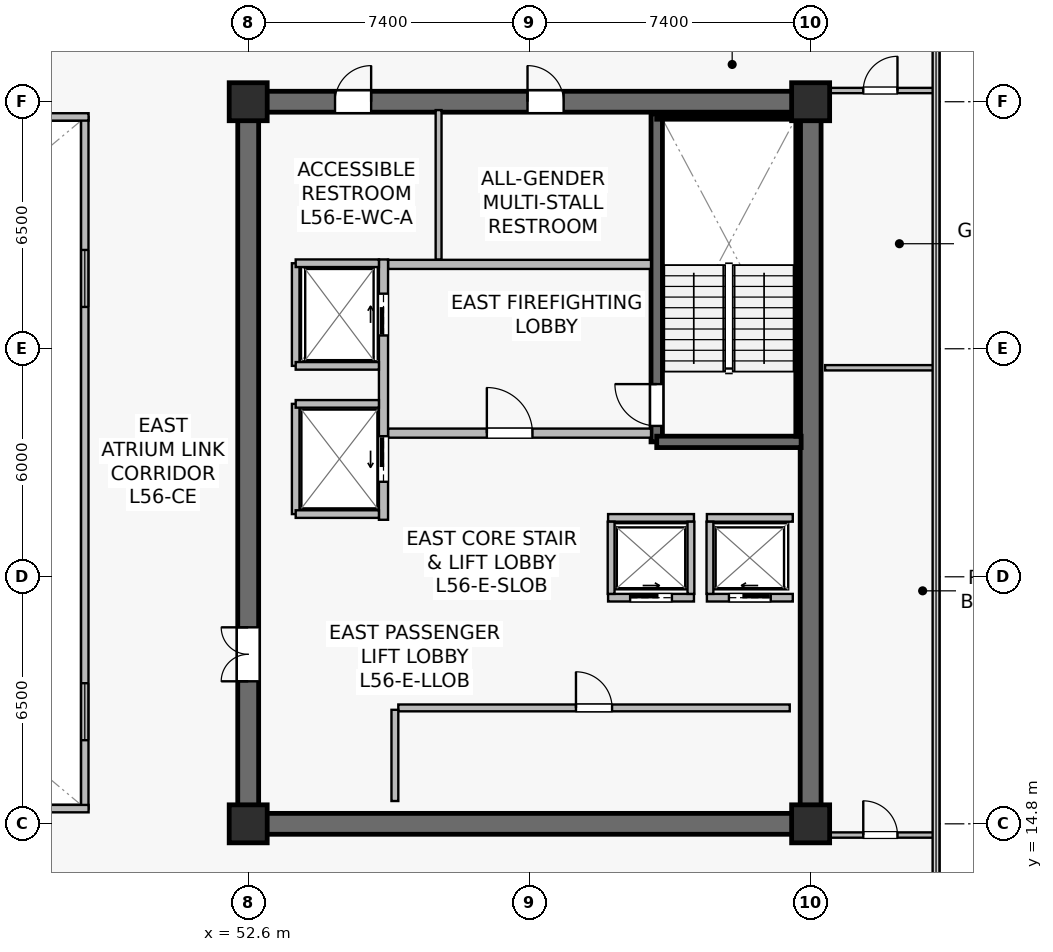
"""IFC4 building model, lengths in metres.
Left out: names, types, materials, properties, quantities, classifications, styles, units other than length and angle.
Written with IfcOpenShell. Run it as: python <this file> out.ifc"""

import sys

from ifc_helpers import new_model, si_unit, direction, frame, frame_2d, origin, origin_2d, place, context, subcontext, project, spatial, rectangle, extrude, source, transform, mapped, element, fill, save


model = new_model("IFC4")
c1 = context("Model", 3, precision=1e-05, world=origin(), true_north=direction((0.0, 1.0)))
c2 = subcontext(c1, "Body", "Model", "MODEL_VIEW")
j1 = project(units=[si_unit("LENGTHUNIT", "METRE"), si_unit("PLANEANGLEUNIT", "RADIAN")], contexts=[c1])
p1 = place(None, origin())
s1 = spatial("IfcSite", under=j1, at=p1, CompositionType="ELEMENT")
p2 = place(p1, origin())
s2 = spatial("IfcBuilding", under=s1, at=p2, CompositionType="ELEMENT")
p3 = place(p2, frame((0.0, 0.0, 234.2)))
s3 = spatial("IfcBuildingStorey", under=s2, at=p3, CompositionType="ELEMENT", Elevation=234.2)
p4 = place(p3, frame((52.325, 14.8, 0.0), z_axis=(0.0, 0.0, 1.0), x_axis=(1.0, 0.0, 0.0)))
e1 = element("IfcWall", 1, at=p4, inside=s3, PredefinedType="SHEAR", context=c2, shape_type="SweptSolid", body=[
    extrude(rectangle(XDim=15.35, YDim=0.55, at=frame_2d((7.675, 0.0))), origin(), (0.0, 0.0, 1.0), 3.8),
])
p5 = place(p3, frame((52.325, 33.8, 0.0), z_axis=(0.0, 0.0, 1.0), x_axis=(1.0, 0.0, 0.0)))
e2 = element("IfcWall", 2, at=p5, inside=s3, PredefinedType="SHEAR", context=c2, shape_type="SweptSolid", body=[
    extrude(rectangle(XDim=15.35, YDim=0.55, at=frame_2d((7.675, 0.0))), origin(), (0.0, 0.0, 1.0), 3.8),
])
p6 = place(p5, frame((7.625, 0.0, 0.0)))
e3 = element("IfcOpeningElement", 3, at=p6, cuts=e2, PredefinedType="OPENING", context=c2, shape_type="SweptSolid", body=[
    extrude(rectangle(XDim=0.95, YDim=2.15, at=frame_2d((0.475, 1.075))), frame((0.0, 0.285, 0.0), z_axis=(0.0, -1.0, 0.0), x_axis=(1.0, 0.0, 0.0)), (0.0, 0.0, 1.0), 0.57),
])
p7 = place(p5, frame((2.56, 0.0, 0.0)))
e4 = element("IfcOpeningElement", 4, at=p7, cuts=e2, PredefinedType="OPENING", context=c2, shape_type="SweptSolid", body=[
    extrude(rectangle(XDim=0.95, YDim=2.15, at=frame_2d((0.475, 1.075))), frame((0.0, 0.285, 0.0), z_axis=(0.0, -1.0, 0.0), x_axis=(1.0, 0.0, 0.0)), (0.0, 0.0, 1.0), 0.57),
])
p8 = place(p3, frame((52.6, 15.075, 0.0), z_axis=(0.0, 0.0, 1.0), x_axis=(0.0, 1.0, 0.0)))
e5 = element("IfcWall", 5, at=p8, inside=s3, PredefinedType="SHEAR", context=c2, shape_type="SweptSolid", body=[
    extrude(rectangle(XDim=18.45, YDim=0.55, at=frame_2d((9.225, 0.0))), origin(), (0.0, 0.0, 1.0), 3.8),
])
p9 = place(p8, frame((3.475, 0.0, 0.0)))
e6 = element("IfcOpeningElement", 6, at=p9, cuts=e5, PredefinedType="OPENING", context=c2, shape_type="SweptSolid", body=[
    extrude(rectangle(XDim=1.42, YDim=2.2, at=frame_2d((0.71, 1.1))), frame((0.0, 0.285, 0.0), z_axis=(0.0, -1.0, 0.0), x_axis=(1.0, 0.0, 0.0)), (0.0, 0.0, 1.0), 0.57),
])
p10 = place(p3, frame((67.4, 15.075, 0.0), z_axis=(0.0, 0.0, 1.0), x_axis=(0.0, 1.0, 0.0)))
e7 = element("IfcWall", 7, at=p10, inside=s3, PredefinedType="SHEAR", context=c2, shape_type="SweptSolid", body=[
    extrude(rectangle(XDim=18.45, YDim=0.55, at=frame_2d((9.225, 0.0))), origin(), (0.0, 0.0, 1.0), 3.8),
])
p11 = place(p3, frame((63.35, 24.85, 0.0), z_axis=(0.0, 0.0, 1.0), x_axis=(0.0, 1.0, 0.0)))
e8 = element("IfcWall", 8, at=p11, inside=s3, PredefinedType="SHEAR", context=c2, shape_type="SweptSolid", body=[
    extrude(rectangle(XDim=8.63, YDim=0.3, at=frame_2d((4.315, 0.0))), origin(), (0.0, 0.0, 1.0), 3.8),
])
p12 = place(p11, frame((0.42, 0.0, 0.0)))
e9 = element("IfcOpeningElement", 9, at=p12, cuts=e8, PredefinedType="OPENING", context=c2, shape_type="SweptSolid", body=[
    extrude(rectangle(XDim=1.1, YDim=2.15, at=frame_2d((0.55, 1.075))), frame((0.0, 0.16, 0.0), z_axis=(0.0, -1.0, 0.0), x_axis=(1.0, 0.0, 0.0)), (0.0, 0.0, 1.0), 0.32),
])
p13 = place(p3, frame((63.35, 24.85, 0.0), z_axis=(0.0, 0.0, 1.0), x_axis=(1.0, 0.0, 0.0)))
e10 = element("IfcWall", 10, at=p13, inside=s3, PredefinedType="SHEAR", context=c2, shape_type="SweptSolid", body=[
    extrude(rectangle(XDim=3.8, YDim=0.3, at=frame_2d((1.9, 0.0))), origin(), (0.0, 0.0, 1.0), 3.8),
])
p14 = place(p3, frame((63.35, 33.4, 0.0), z_axis=(0.0, 0.0, 1.0), x_axis=(1.0, 0.0, 0.0)))
e11 = element("IfcWall", 11, at=p14, inside=s3, PredefinedType="SOLIDWALL", context=c2, shape_type="SweptSolid", body=[
    extrude(rectangle(XDim=3.72, YDim=0.12, at=frame_2d((1.86, 0.0))), origin(), (0.0, 0.0, 1.0), 3.8),
])
p15 = place(p3, frame((67.07, 25.0, 0.0), z_axis=(0.0, 0.0, 1.0), x_axis=(0.0, 1.0, 0.0)))
e12 = element("IfcWall", 12, at=p15, inside=s3, PredefinedType="SOLIDWALL", context=c2, shape_type="SweptSolid", body=[
    extrude(rectangle(XDim=8.32, YDim=0.12, at=frame_2d((4.16, 0.0))), origin(), (0.0, 0.0, 1.0), 3.8),
])
m1 = source(origin(), c2, "Body", "SweptSolid", [
    extrude(rectangle(XDim=1.0, YDim=1.0, at=origin_2d()), origin(), (0.0, 0.0, 1.0), 4.1),
])
for number, where, z_axis, x_axis in (
    (13, (52.6, 14.8, 0.0), (0.0, 0.0, 1.0), (1.0, 0.0, 0.0)),
    (14, (67.4, 14.8, 0.0), (0.0, 0.0, 1.0), (1.0, 0.0, 0.0)),
    (15, (52.6, 33.8, 0.0), (0.0, 0.0, 1.0), (1.0, 0.0, 0.0)),
    (16, (67.4, 33.8, 0.0), (0.0, 0.0, 1.0), (1.0, 0.0, 0.0)),
):
    element("IfcColumn", number, at=place(p3, frame(where, z_axis=z_axis, x_axis=x_axis)), inside=s3, PredefinedType="COLUMN", context=c2, shape_type="MappedRepresentation", body=[
        mapped(m1, transform((0.0, 0.0, 0.0), scale=1.0)),
    ])
p16 = place(p3, frame((56.28, 25.08, 0.0), z_axis=(0.0, 0.0, 1.0), x_axis=(1.0, 0.0, 0.0)))
e17 = element("IfcWall", 17, at=p16, inside=s3, PredefinedType="SOLIDWALL", context=c2, shape_type="SweptSolid", body=[
    extrude(rectangle(XDim=6.92, YDim=0.24, at=frame_2d((3.46, 0.0))), origin(), (0.0, 0.0, 1.0), 3.197),
])
p17 = place(p16, frame((2.6, 0.0, 0.0)))
e18 = element("IfcOpeningElement", 18, at=p17, cuts=e17, PredefinedType="OPENING", context=c2, shape_type="SweptSolid", body=[
    extrude(rectangle(XDim=1.2, YDim=2.16, at=frame_2d((0.6, 1.08))), frame((0.0, 0.13, 0.0), z_axis=(0.0, -1.0, 0.0), x_axis=(1.0, 0.0, 0.0)), (0.0, 0.0, 1.0), 0.26),
])
p18 = place(p3, frame((56.28, 29.52, 0.0), z_axis=(0.0, 0.0, 1.0), x_axis=(1.0, 0.0, 0.0)))
e19 = element("IfcWall", 19, at=p18, inside=s3, PredefinedType="SOLIDWALL", context=c2, shape_type="SweptSolid", body=[
    extrude(rectangle(XDim=6.92, YDim=0.24, at=frame_2d((3.46, 0.0))), origin(), (0.0, 0.0, 1.0), 3.197),
])
p19 = place(p3, frame((56.16, 22.8, 0.0), z_axis=(0.0, 0.0, 1.0), x_axis=(0.0, 1.0, 0.0)))
e20 = element("IfcWall", 20, at=p19, inside=s3, PredefinedType="SOLIDWALL", context=c2, shape_type="SweptSolid", body=[
    extrude(rectangle(XDim=6.85, YDim=0.24, at=frame_2d((3.425, 0.0))), origin(), (0.0, 0.0, 1.0), 2.935),
])
p20 = place(p19, frame((4.85, 0.0, 0.0)))
e21 = element("IfcOpeningElement", 21, at=p20, cuts=e20, PredefinedType="OPENING", context=c2, shape_type="SweptSolid", body=[
    extrude(rectangle(XDim=1.1, YDim=2.22, at=frame_2d((0.55, 1.11))), frame((0.0, 0.13, 0.0), z_axis=(0.0, -1.0, 0.0), x_axis=(1.0, 0.0, 0.0)), (0.0, 0.0, 1.0), 0.26),
])
p21 = place(p19, frame((1.0, 0.0, 0.0)))
e22 = element("IfcOpeningElement", 22, at=p21, cuts=e20, PredefinedType="OPENING", context=c2, shape_type="SweptSolid", body=[
    extrude(rectangle(XDim=1.2, YDim=2.22, at=frame_2d((0.6, 1.11))), frame((0.0, 0.13, 0.0), z_axis=(0.0, -1.0, 0.0), x_axis=(1.0, 0.0, 0.0)), (0.0, 0.0, 1.0), 0.26),
])
p22 = place(p3, frame((64.67, 20.75, 0.0), z_axis=(0.0, 0.0, 1.0), x_axis=(1.0, 0.0, 0.0)))
e23 = element("IfcWall", 23, at=p22, inside=s3, PredefinedType="SOLIDWALL", context=c2, shape_type="SweptSolid", body=[
    extrude(rectangle(XDim=2.26, YDim=0.2, at=frame_2d((1.13, 0.0))), origin(), (0.0, 0.0, 1.0), 3.8),
])
p23 = place(p22, frame((0.58, 0.0, 0.0)))
e24 = element("IfcOpeningElement", 24, at=p23, cuts=e23, PredefinedType="OPENING", context=c2, shape_type="SweptSolid", body=[
    extrude(rectangle(XDim=1.1, YDim=2.22, at=frame_2d((0.55, 1.11))), frame((0.0, 0.11, 0.0), z_axis=(0.0, -1.0, 0.0), x_axis=(1.0, 0.0, 0.0)), (0.0, 0.0, 1.0), 0.22),
])
p24 = place(p3, frame((64.67, 22.85, 0.0), z_axis=(0.0, 0.0, 1.0), x_axis=(1.0, 0.0, 0.0)))
e25 = element("IfcWall", 25, at=p24, inside=s3, PredefinedType="SOLIDWALL", context=c2, shape_type="SweptSolid", body=[
    extrude(rectangle(XDim=2.26, YDim=0.2, at=frame_2d((1.13, 0.0))), origin(), (0.0, 0.0, 1.0), 3.8),
])
p25 = place(p3, frame((64.75, 20.85, 0.0), z_axis=(0.0, 0.0, 1.0), x_axis=(0.0, 1.0, 0.0)))
e26 = element("IfcWall", 26, at=p25, inside=s3, PredefinedType="SOLIDWALL", context=c2, shape_type="SweptSolid", body=[
    extrude(rectangle(XDim=1.9, YDim=0.18, at=frame_2d((0.95, 0.0))), origin(), (0.0, 0.0, 1.0), 3.8),
])
p26 = place(p3, frame((62.07, 20.75, 0.0), z_axis=(0.0, 0.0, 1.0), x_axis=(1.0, 0.0, 0.0)))
e27 = element("IfcWall", 27, at=p26, inside=s3, PredefinedType="SOLIDWALL", context=c2, shape_type="SweptSolid", body=[
    extrude(rectangle(XDim=2.26, YDim=0.2, at=frame_2d((1.13, 0.0))), origin(), (0.0, 0.0, 1.0), 3.8),
])
p27 = place(p26, frame((0.58, 0.0, 0.0)))
e28 = element("IfcOpeningElement", 28, at=p27, cuts=e27, PredefinedType="OPENING", context=c2, shape_type="SweptSolid", body=[
    extrude(rectangle(XDim=1.1, YDim=2.22, at=frame_2d((0.55, 1.11))), frame((0.0, 0.11, 0.0), z_axis=(0.0, -1.0, 0.0), x_axis=(1.0, 0.0, 0.0)), (0.0, 0.0, 1.0), 0.22),
])
p28 = place(p3, frame((62.07, 22.85, 0.0), z_axis=(0.0, 0.0, 1.0), x_axis=(1.0, 0.0, 0.0)))
e29 = element("IfcWall", 29, at=p28, inside=s3, PredefinedType="SOLIDWALL", context=c2, shape_type="SweptSolid", body=[
    extrude(rectangle(XDim=2.26, YDim=0.2, at=frame_2d((1.13, 0.0))), origin(), (0.0, 0.0, 1.0), 3.8),
])
for number, where, z_axis, x_axis in (
    (30, (62.15, 20.85, 0.0), (0.0, 0.0, 1.0), (0.0, 1.0, 0.0)),
    (31, (64.25, 20.85, 0.0), (0.0, 0.0, 1.0), (0.0, 1.0, 0.0)),
):
    element("IfcWall", number, at=place(p3, frame(where, z_axis=z_axis, x_axis=x_axis)), inside=s3, PredefinedType="SOLIDWALL", context=c2, shape_type="SweptSolid", body=[
        extrude(rectangle(XDim=1.9, YDim=0.18, at=frame_2d((0.95, 0.0))), origin(), (0.0, 0.0, 1.0), 3.8),
    ])
p29 = place(p3, frame((53.85, 26.85, 0.0), z_axis=(0.0, 0.0, 1.0), x_axis=(0.0, 1.0, 0.0)))
e32 = element("IfcWall", 32, at=p29, inside=s3, PredefinedType="SOLIDWALL", context=c2, shape_type="SweptSolid", body=[
    extrude(rectangle(XDim=2.7, YDim=0.2, at=frame_2d((1.35, 0.0))), origin(), (0.0, 0.0, 1.0), 3.8),
])
p30 = place(p3, frame((53.85, 29.55, 0.0), z_axis=(0.0, 0.0, 1.0), x_axis=(1.0, 0.0, 0.0)))
e33 = element("IfcWall", 33, at=p30, inside=s3, PredefinedType="SOLIDWALL", context=c2, shape_type="SweptSolid", body=[
    extrude(rectangle(XDim=2.19, YDim=0.2, at=frame_2d((1.095, 0.0))), origin(), (0.0, 0.0, 1.0), 3.8),
])
p31 = place(p3, frame((53.85, 26.85, 0.0), z_axis=(0.0, 0.0, 1.0), x_axis=(1.0, 0.0, 0.0)))
e34 = element("IfcWall", 34, at=p31, inside=s3, PredefinedType="SOLIDWALL", context=c2, shape_type="SweptSolid", body=[
    extrude(rectangle(XDim=2.19, YDim=0.2, at=frame_2d((1.095, 0.0))), origin(), (0.0, 0.0, 1.0), 3.197),
])
p32 = place(p3, frame((53.85, 22.95, 0.0), z_axis=(0.0, 0.0, 1.0), x_axis=(0.0, 1.0, 0.0)))
e35 = element("IfcWall", 35, at=p32, inside=s3, PredefinedType="SOLIDWALL", context=c2, shape_type="SweptSolid", body=[
    extrude(rectangle(XDim=2.9, YDim=0.2, at=frame_2d((1.45, 0.0))), origin(), (0.0, 0.0, 1.0), 2.935),
])
for number, where, z_axis, x_axis in (
    (36, (53.85, 25.85, 0.0), (0.0, 0.0, 1.0), (1.0, 0.0, 0.0)),
    (37, (53.85, 22.95, 0.0), (0.0, 0.0, 1.0), (1.0, 0.0, 0.0)),
):
    element("IfcWall", number, at=place(p3, frame(where, z_axis=z_axis, x_axis=x_axis)), inside=s3, PredefinedType="SOLIDWALL", context=c2, shape_type="SweptSolid", body=[
        extrude(rectangle(XDim=2.19, YDim=0.2, at=frame_2d((1.095, 0.0))), origin(), (0.0, 0.0, 1.0), 3.8),
    ])
p33 = place(p3, frame((56.55, 17.85, 0.0), z_axis=(0.0, 0.0, 1.0), x_axis=(1.0, 0.0, 0.0)))
e38 = element("IfcWall", 38, at=p33, inside=s3, PredefinedType="SOLIDWALL", context=c2, shape_type="SweptSolid", body=[
    extrude(rectangle(XDim=10.3, YDim=0.18, at=frame_2d((5.15, 0.0))), origin(), (0.0, 0.0, 1.0), 3.197),
])
p34 = place(p33, frame((4.675, 0.0, 0.0)))
e39 = element("IfcOpeningElement", 39, at=p34, cuts=e38, PredefinedType="OPENING", context=c2, shape_type="SweptSolid", body=[
    extrude(rectangle(XDim=0.95, YDim=2.15, at=frame_2d((0.475, 1.075))), frame((0.0, 0.1, 0.0), z_axis=(0.0, -1.0, 0.0), x_axis=(1.0, 0.0, 0.0)), (0.0, 0.0, 1.0), 0.2),
])
p35 = place(p3, frame((56.46, 15.4, 0.0), z_axis=(0.0, 0.0, 1.0), x_axis=(0.0, 1.0, 0.0)))
e40 = element("IfcWall", 40, at=p35, inside=s3, PredefinedType="SOLIDWALL", context=c2, shape_type="SweptSolid", body=[
    extrude(rectangle(XDim=2.4, YDim=0.18, at=frame_2d((1.2, 0.0))), origin(), (0.0, 0.0, 1.0), 3.8),
])
p36 = place(p3, frame((57.61, 29.65, 0.0), z_axis=(0.0, 0.0, 1.0), x_axis=(0.0, 1.0, 0.0)))
e41 = element("IfcWall", 41, at=p36, inside=s3, PredefinedType="PLUMBINGWALL", context=c2, shape_type="SweptSolid", body=[
    extrude(rectangle(XDim=3.93, YDim=0.155, at=frame_2d((1.965, 0.0))), origin(), (0.0, 0.0, 1.0), 3.8),
])
p37 = place(p3, frame((48.3, 15.2, 0.0), z_axis=(0.0, 0.0, 1.0), x_axis=(0.0, 1.0, 0.0)))
e42 = element("IfcWall", 42, at=p37, inside=s3, PredefinedType="SOLIDWALL", context=c2, shape_type="SweptSolid", body=[
    extrude(rectangle(XDim=18.2, YDim=0.195, at=frame_2d((9.1, 0.0))), origin(), (0.0, 0.0, 1.0), 3.8),
])
p38 = place(p37, frame((1.8, 0.0, 0.9)))
e43 = element("IfcOpeningElement", 43, at=p38, cuts=e42, PredefinedType="OPENING", context=c2, shape_type="SweptSolid", body=[
    extrude(rectangle(XDim=1.5, YDim=1.4, at=frame_2d((0.75, 0.7))), frame((0.0, 0.107, 0.0), z_axis=(0.0, -1.0, 0.0), x_axis=(1.0, 0.0, 0.0)), (0.0, 0.0, 1.0), 0.215),
])
p39 = place(p37, frame((13.2, 0.0, 0.9)))
e44 = element("IfcOpeningElement", 44, at=p39, cuts=e42, PredefinedType="OPENING", context=c2, shape_type="SweptSolid", body=[
    extrude(rectangle(XDim=1.5, YDim=1.4, at=frame_2d((0.75, 0.7))), frame((0.0, 0.107, 0.0), z_axis=(0.0, -1.0, 0.0), x_axis=(1.0, 0.0, 0.0)), (0.0, 0.0, 1.0), 0.215),
])
for number, where, z_axis, x_axis in (
    (45, (26.4, 15.2, 0.0), (0.0, 0.0, 1.0), (1.0, 0.0, 0.0)),
    (46, (26.4, 33.4, 0.0), (0.0, 0.0, 1.0), (1.0, 0.0, 0.0)),
):
    element("IfcWall", number, at=place(p3, frame(where, z_axis=z_axis, x_axis=x_axis)), inside=s3, PredefinedType="SOLIDWALL", context=c2, shape_type="SweptSolid", body=[
        extrude(rectangle(XDim=22.0, YDim=0.195, at=frame_2d((11.0, 0.0))), origin(), (0.0, 0.0, 1.0), 3.8),
    ])
p40 = place(p3, frame((67.78, 26.8, 0.0), z_axis=(0.0, 0.0, 1.0), x_axis=(1.0, 0.0, 0.0)))
e47 = element("IfcWall", 47, at=p40, inside=s3, PredefinedType="PARTITIONING", context=c2, shape_type="SweptSolid", body=[
    extrude(rectangle(XDim=2.91, YDim=0.14, at=frame_2d((1.455, 0.0))), origin(), (0.0, 0.0, 1.0), 3.8),
])
p41 = place(p3, frame((67.78, 14.505, 0.0), z_axis=(0.0, 0.0, 1.0), x_axis=(1.0, 0.0, 0.0)))
e48 = element("IfcWall", 48, at=p41, inside=s3, PredefinedType="PARTITIONING", context=c2, shape_type="SweptSolid", body=[
    extrude(rectangle(XDim=2.91, YDim=0.14, at=frame_2d((1.455, 0.0))), origin(), (0.0, 0.0, 1.0), 3.8),
])
p42 = place(p41, frame((1.005, 0.0, 0.0)))
e49 = element("IfcOpeningElement", 49, at=p42, cuts=e48, PredefinedType="OPENING", context=c2, shape_type="SweptSolid", body=[
    extrude(rectangle(XDim=0.9, YDim=2.1, at=frame_2d((0.45, 1.05))), frame((0.0, 0.08, 0.0), z_axis=(0.0, -1.0, 0.0), x_axis=(1.0, 0.0, 0.0)), (0.0, 0.0, 1.0), 0.16),
])
p43 = place(p3, frame((67.78, 34.095, 0.0), z_axis=(0.0, 0.0, 1.0), x_axis=(1.0, 0.0, 0.0)))
e50 = element("IfcWall", 50, at=p43, inside=s3, PredefinedType="PARTITIONING", context=c2, shape_type="SweptSolid", body=[
    extrude(rectangle(XDim=2.91, YDim=0.14, at=frame_2d((1.455, 0.0))), origin(), (0.0, 0.0, 1.0), 3.8),
])
p44 = place(p43, frame((1.005, 0.0, 0.0)))
e51 = element("IfcOpeningElement", 51, at=p44, cuts=e50, PredefinedType="OPENING", context=c2, shape_type="SweptSolid", body=[
    extrude(rectangle(XDim=0.9, YDim=2.1, at=frame_2d((0.45, 1.05))), frame((0.0, 0.08, 0.0), z_axis=(0.0, -1.0, 0.0), x_axis=(1.0, 0.0, 0.0)), (0.0, 0.0, 1.0), 0.16),
])
m2 = source(origin(), c2, "Body", "SweptSolid", [
    extrude(rectangle(XDim=1.5, YDim=1.4, at=frame_2d((0.75, 0.7))), frame((0.0, 0.03, 0.0), z_axis=(0.0, -1.0, 0.0), x_axis=(1.0, 0.0, 0.0)), (0.0, 0.0, 1.0), 0.06),
])
p45 = place(p38, origin())
e52 = element("IfcWindow", 52, at=p45, inside=s3, PartitioningType="SINGLE_PANEL", PredefinedType="WINDOW", context=c2, shape_type="MappedRepresentation", body=[
    mapped(m2, transform((0.0, 0.0, 0.0), scale=1.0)),
])
fill(e43, e52)
p46 = place(p39, origin())
e53 = element("IfcWindow", 53, at=p46, inside=s3, PartitioningType="SINGLE_PANEL", PredefinedType="WINDOW", context=c2, shape_type="MappedRepresentation", body=[
    mapped(m2, transform((0.0, 0.0, 0.0), scale=1.0)),
])
fill(e44, e53)
m3 = source(origin(), c2, "Body", "SweptSolid", [
    extrude(rectangle(XDim=1.1, YDim=2.15, at=frame_2d((0.55, 1.075))), frame((0.0, 0.025, 0.0), z_axis=(0.0, -1.0, 0.0), x_axis=(1.0, 0.0, 0.0)), (0.0, 0.0, 1.0), 0.05),
])
p47 = place(p12, origin())
e54 = element("IfcDoor", 54, at=p47, inside=s3, OperationType="SINGLE_SWING_RIGHT", PredefinedType="DOOR", context=c2, shape_type="MappedRepresentation", body=[
    mapped(m3, transform((0.0, 0.0, 0.0), scale=1.0)),
])
fill(e9, e54)
m4 = source(origin(), c2, "Body", "SweptSolid", [
    extrude(rectangle(XDim=1.2, YDim=2.16, at=frame_2d((0.6, 1.08))), frame((0.0, 0.025, 0.0), z_axis=(0.0, -1.0, 0.0), x_axis=(1.0, 0.0, 0.0)), (0.0, 0.0, 1.0), 0.05),
])
p48 = place(p17, origin())
e55 = element("IfcDoor", 55, at=p48, inside=s3, OperationType="SINGLE_SWING_LEFT", PredefinedType="DOOR", context=c2, shape_type="MappedRepresentation", body=[
    mapped(m4, transform((0.0, 0.0, 0.0), scale=1.0)),
])
fill(e18, e55)
m5 = source(origin(), c2, "Body", "SweptSolid", [
    extrude(rectangle(XDim=1.1, YDim=2.22, at=frame_2d((0.55, 1.11))), frame((0.0, 0.025, 0.0), z_axis=(0.0, -1.0, 0.0), x_axis=(1.0, 0.0, 0.0)), (0.0, 0.0, 1.0), 0.05),
])
p49 = place(p23, origin())
e56 = element("IfcDoor", 56, at=p49, inside=s3, OperationType="SLIDING_TO_LEFT", PredefinedType="USERDEFINED", context=c2, shape_type="MappedRepresentation", body=[
    mapped(m5, transform((0.0, 0.0, 0.0), scale=1.0)),
])
fill(e24, e56)
p50 = place(p27, origin())
e57 = element("IfcDoor", 57, at=p50, inside=s3, OperationType="SLIDING_TO_RIGHT", PredefinedType="USERDEFINED", context=c2, shape_type="MappedRepresentation", body=[
    mapped(m5, transform((0.0, 0.0, 0.0), scale=1.0)),
])
fill(e28, e57)
p51 = place(p20, origin())
e58 = element("IfcDoor", 58, at=p51, inside=s3, OperationType="SLIDING_TO_RIGHT", PredefinedType="USERDEFINED", context=c2, shape_type="MappedRepresentation", body=[
    mapped(m5, transform((0.0, 0.0, 0.0), scale=1.0)),
])
fill(e21, e58)
m6 = source(origin(), c2, "Body", "SweptSolid", [
    extrude(rectangle(XDim=1.2, YDim=2.22, at=frame_2d((0.6, 1.11))), frame((0.0, 0.025, 0.0), z_axis=(0.0, -1.0, 0.0), x_axis=(1.0, 0.0, 0.0)), (0.0, 0.0, 1.0), 0.05),
])
p52 = place(p21, origin())
e59 = element("IfcDoor", 59, at=p52, inside=s3, OperationType="SLIDING_TO_LEFT", PredefinedType="USERDEFINED", context=c2, shape_type="MappedRepresentation", body=[
    mapped(m6, transform((0.0, 0.0, 0.0), scale=1.0)),
])
fill(e22, e59)
m7 = source(origin(), c2, "Body", "SweptSolid", [
    extrude(rectangle(XDim=0.95, YDim=2.15, at=frame_2d((0.475, 1.075))), frame((0.0, 0.025, 0.0), z_axis=(0.0, -1.0, 0.0), x_axis=(1.0, 0.0, 0.0)), (0.0, 0.0, 1.0), 0.05),
])
p53 = place(p34, origin())
e60 = element("IfcDoor", 60, at=p53, inside=s3, OperationType="SINGLE_SWING_LEFT", PredefinedType="DOOR", context=c2, shape_type="MappedRepresentation", body=[
    mapped(m7, transform((0.0, 0.0, 0.0), scale=1.0)),
])
fill(e39, e60)
m8 = source(origin(), c2, "Body", "SweptSolid", [
    extrude(rectangle(XDim=1.42, YDim=2.2, at=frame_2d((0.71, 1.1))), frame((0.0, 0.025, 0.0), z_axis=(0.0, -1.0, 0.0), x_axis=(1.0, 0.0, 0.0)), (0.0, 0.0, 1.0), 0.05),
])
p54 = place(p9, origin())
e61 = element("IfcDoor", 61, at=p54, inside=s3, OperationType="DOUBLE_DOOR_SINGLE_SWING", PredefinedType="DOOR", context=c2, shape_type="MappedRepresentation", body=[
    mapped(m8, transform((0.0, 0.0, 0.0), scale=1.0)),
])
fill(e6, e61)
p55 = place(p6, origin())
e62 = element("IfcDoor", 62, at=p55, inside=s3, OperationType="SINGLE_SWING_LEFT", PredefinedType="DOOR", context=c2, shape_type="MappedRepresentation", body=[
    mapped(m7, transform((0.0, 0.0, 0.0), scale=1.0)),
])
fill(e3, e62)
p56 = place(p7, origin())
e63 = element("IfcDoor", 63, at=p56, inside=s3, OperationType="SINGLE_SWING_RIGHT", PredefinedType="DOOR", context=c2, shape_type="MappedRepresentation", body=[
    mapped(m7, transform((0.0, 0.0, 0.0), scale=1.0)),
])
fill(e4, e63)
m9 = source(origin(), c2, "Body", "SweptSolid", [
    extrude(rectangle(XDim=0.9, YDim=2.1, at=frame_2d((0.45, 1.05))), frame((0.0, 0.025, 0.0), z_axis=(0.0, -1.0, 0.0), x_axis=(1.0, 0.0, 0.0)), (0.0, 0.0, 1.0), 0.05),
])
p57 = place(p42, origin())
e64 = element("IfcDoor", 64, at=p57, inside=s3, OperationType="SINGLE_SWING_LEFT", PredefinedType="DOOR", context=c2, shape_type="MappedRepresentation", body=[
    mapped(m9, transform((0.0, 0.0, 0.0), scale=1.0)),
])
fill(e49, e64)
p58 = place(p44, origin())
e65 = element("IfcDoor", 65, at=p58, inside=s3, OperationType="SINGLE_SWING_RIGHT", PredefinedType="DOOR", context=c2, shape_type="MappedRepresentation", body=[
    mapped(m9, transform((0.0, 0.0, 0.0), scale=1.0)),
])
fill(e51, e65)
save(model, sys.argv[1])
